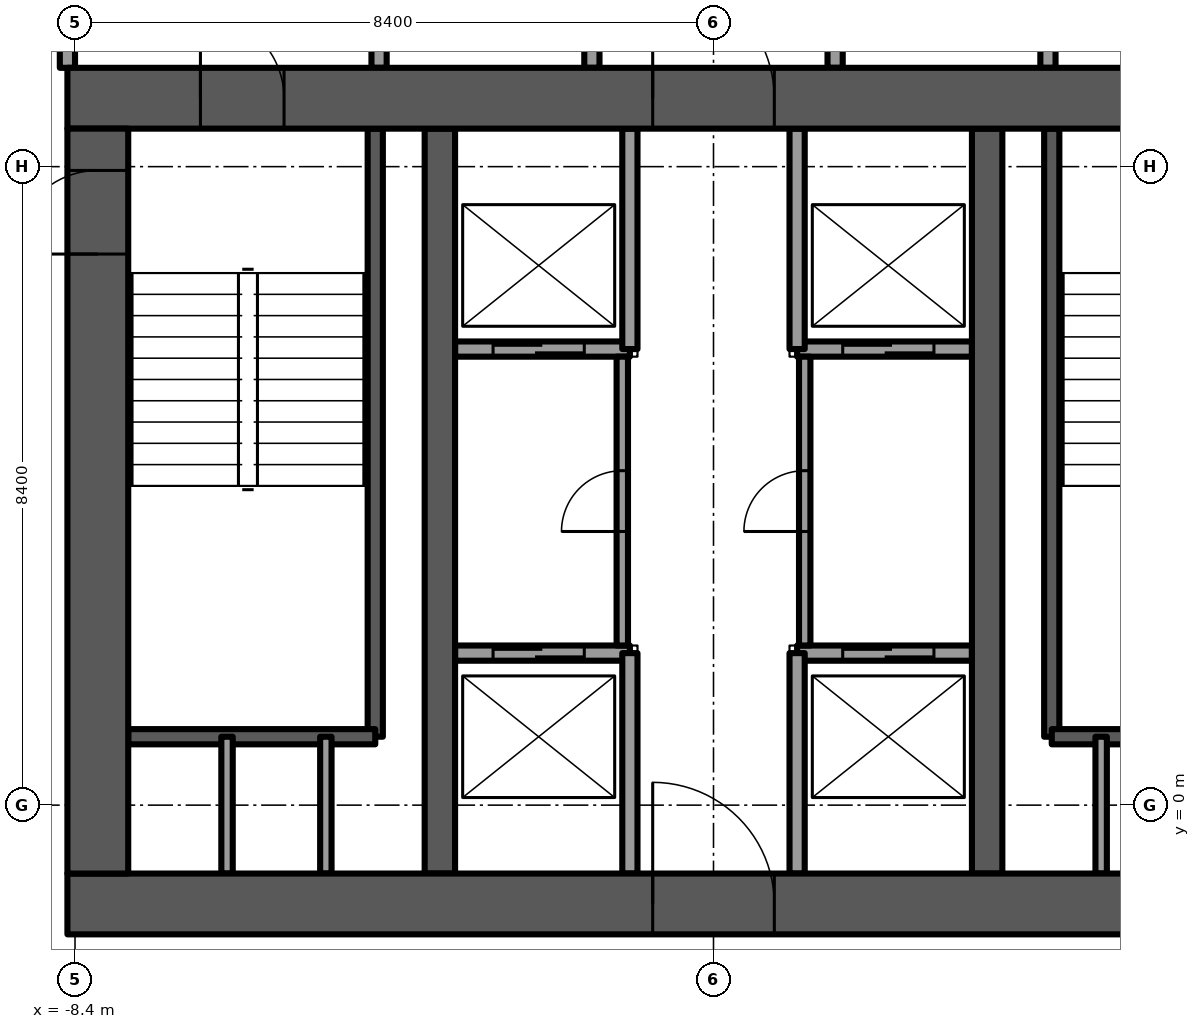
"""IFC4 building model, lengths in metres.
Left out: names, types, materials, properties, quantities, classifications, styles, units other than length and angle.
Written with IfcOpenShell. Run it as: python <this file> out.ifc"""

import sys

from ifc_helpers import new_model, si_unit, direction, frame, frame_2d, origin, place, context, subcontext, project, spatial, rectangle, extrude, element, fill, save


model = new_model("IFC4")
c1 = context("Model", 3, precision=1e-05, world=origin(), true_north=direction((0.0, 1.0)))
c2 = subcontext(c1, "Body", "Model", "MODEL_VIEW")
j1 = project(units=[si_unit("LENGTHUNIT", "METRE"), si_unit("PLANEANGLEUNIT", "RADIAN")], contexts=[c1])
p1 = place(None, origin())
s1 = spatial("IfcSite", under=j1, at=p1, CompositionType="ELEMENT")
p2 = place(p1, origin())
s2 = spatial("IfcBuilding", under=s1, at=p2, CompositionType="ELEMENT")
p3 = place(p2, frame((0.0, 0.0, 190.75)))
s3 = spatial("IfcBuildingStorey", under=s2, at=p3, CompositionType="ELEMENT", Elevation=190.75)
p4 = place(p3, frame((-8.5, -1.3, -0.3), z_axis=(0.0, 0.0, 1.0), x_axis=(1.0, 0.0, 0.0)))
e1 = element("IfcWall", 1, at=p4, inside=s3, PredefinedType="SHEAR", context=c2, shape_type="SweptSolid", body=[
    extrude(rectangle(XDim=17.0, YDim=0.8, at=frame_2d((8.5, 0.0))), origin(), (0.0, 0.0, 1.0), 3.75),
])
p5 = place(p4, frame((7.7, 0.0, 0.0)))
e2 = element("IfcOpeningElement", 2, at=p5, cuts=e1, PredefinedType="OPENING", context=c2, shape_type="SweptSolid", body=[
    extrude(rectangle(XDim=1.6, YDim=2.1, at=frame_2d((0.8, 1.05))), frame((0.0, 0.4, 0.0), z_axis=(0.0, -1.0, 0.0), x_axis=(1.0, 0.0, 0.0)), (0.0, 0.0, 1.0), 0.8),
])
p6 = place(p3, frame((-8.5, 9.3, -0.3), z_axis=(0.0, 0.0, 1.0), x_axis=(1.0, 0.0, 0.0)))
e3 = element("IfcWall", 3, at=p6, inside=s3, PredefinedType="SHEAR", context=c2, shape_type="SweptSolid", body=[
    extrude(rectangle(XDim=17.0, YDim=0.8, at=frame_2d((8.5, 0.0))), origin(), (0.0, 0.0, 1.0), 3.75),
])
p7 = place(p6, frame((7.7, 0.0, 0.0)))
e4 = element("IfcOpeningElement", 4, at=p7, cuts=e3, PredefinedType="OPENING", context=c2, shape_type="SweptSolid", body=[
    extrude(rectangle(XDim=1.6, YDim=2.1, at=frame_2d((0.8, 1.05))), frame((0.0, 0.4, 0.0), z_axis=(0.0, -1.0, 0.0), x_axis=(1.0, 0.0, 0.0)), (0.0, 0.0, 1.0), 0.8),
])
p8 = place(p6, frame((1.75, 0.0, 0.0)))
e5 = element("IfcOpeningElement", 5, at=p8, cuts=e3, PredefinedType="OPENING", context=c2, shape_type="SweptSolid", body=[
    extrude(rectangle(XDim=1.1, YDim=2.1, at=frame_2d((0.55, 1.05))), frame((0.0, 0.4, 0.0), z_axis=(0.0, -1.0, 0.0), x_axis=(1.0, 0.0, 0.0)), (0.0, 0.0, 1.0), 0.8),
])
p9 = place(p6, frame((14.15, 0.0, 0.0)))
e6 = element("IfcOpeningElement", 6, at=p9, cuts=e3, PredefinedType="OPENING", context=c2, shape_type="SweptSolid", body=[
    extrude(rectangle(XDim=1.1, YDim=2.1, at=frame_2d((0.55, 1.05))), frame((0.0, 0.4, 0.0), z_axis=(0.0, -1.0, 0.0), x_axis=(1.0, 0.0, 0.0)), (0.0, 0.0, 1.0), 0.8),
])
p10 = place(p3, frame((-8.1, -0.9, -0.3), z_axis=(0.0, 0.0, 1.0), x_axis=(0.0, 1.0, 0.0)))
e7 = element("IfcWall", 7, at=p10, inside=s3, PredefinedType="SHEAR", context=c2, shape_type="SweptSolid", body=[
    extrude(rectangle(XDim=9.8, YDim=0.8, at=frame_2d((4.9, 0.0))), origin(), (0.0, 0.0, 1.0), 3.75),
])
p11 = place(p10, frame((8.15, 0.0, 0.0)))
e8 = element("IfcOpeningElement", 8, at=p11, cuts=e7, PredefinedType="OPENING", context=c2, shape_type="SweptSolid", body=[
    extrude(rectangle(XDim=1.1, YDim=2.1, at=frame_2d((0.55, 1.05))), frame((0.0, 0.4, 0.0), z_axis=(0.0, -1.0, 0.0), x_axis=(1.0, 0.0, 0.0)), (0.0, 0.0, 1.0), 0.8),
])
for number, where, z_axis, x_axis in (
    (9, (-3.6, -0.9, -0.3), (0.0, 0.0, 1.0), (0.0, 1.0, 0.0)),
    (10, (3.6, -0.9, -0.3), (0.0, 0.0, 1.0), (0.0, 1.0, 0.0)),
):
    element("IfcWall", number, at=place(p3, frame(where, z_axis=z_axis, x_axis=x_axis)), inside=s3, PredefinedType="SHEAR", context=c2, shape_type="SweptSolid", body=[
        extrude(rectangle(XDim=9.8, YDim=0.4, at=frame_2d((4.9, 0.0))), origin(), (0.0, 0.0, 1.0), 3.75),
    ])
p12 = place(p3, frame((-6.826, 17.292, 0.0), z_axis=(0.0, 0.0, 1.0), x_axis=(-0.50000659594, -0.866021595583, 0.0)))
e11 = element("IfcWall", 11, at=p12, inside=s3, PredefinedType="SOLIDWALL", context=c2, shape_type="SweptSolid", body=[
    extrude(rectangle(XDim=20.354, YDim=0.15, at=frame_2d((10.177, 0.0))), origin(), (0.0, 0.0, 1.0), 3.45),
])
p13 = place(p12, frame((5.12, 0.0, 0.15)))
e12 = element("IfcOpeningElement", 12, at=p13, cuts=e11, PredefinedType="OPENING", context=c2, shape_type="SweptSolid", body=[
    extrude(rectangle(XDim=1.4, YDim=2.85, at=frame_2d((0.7, 1.425))), frame((0.0, 0.075, 0.0), z_axis=(0.0, -1.0, 0.0), x_axis=(1.0, 0.0, 0.0)), (0.0, 0.0, 1.0), 0.15),
])
p14 = place(p12, frame((7.663, 0.0, 0.15)))
e13 = element("IfcOpeningElement", 13, at=p14, cuts=e11, PredefinedType="OPENING", context=c2, shape_type="SweptSolid", body=[
    extrude(rectangle(XDim=1.6, YDim=2.85, at=frame_2d((0.8, 1.425))), frame((0.0, 0.075, 0.0), z_axis=(0.0, -1.0, 0.0), x_axis=(1.0, 0.0, 0.0)), (0.0, 0.0, 1.0), 0.15),
])
p15 = place(p12, frame((9.863, 0.0, 0.15)))
e14 = element("IfcOpeningElement", 14, at=p15, cuts=e11, PredefinedType="OPENING", context=c2, shape_type="SweptSolid", body=[
    extrude(rectangle(XDim=1.4, YDim=2.85, at=frame_2d((0.7, 1.425))), frame((0.0, 0.075, 0.0), z_axis=(0.0, -1.0, 0.0), x_axis=(1.0, 0.0, 0.0)), (0.0, 0.0, 1.0), 0.15),
])
p16 = place(p12, frame((12.492, 0.0, 0.15)))
e15 = element("IfcOpeningElement", 15, at=p16, cuts=e11, PredefinedType="OPENING", context=c2, shape_type="SweptSolid", body=[
    extrude(rectangle(XDim=0.9, YDim=2.85, at=frame_2d((0.45, 1.425))), frame((0.0, 0.075, 0.0), z_axis=(0.0, -1.0, 0.0), x_axis=(1.0, 0.0, 0.0)), (0.0, 0.0, 1.0), 0.15),
])
p17 = place(p12, frame((14.063, 0.0, 0.0)))
e16 = element("IfcOpeningElement", 16, at=p17, cuts=e11, PredefinedType="OPENING", context=c2, shape_type="SweptSolid", body=[
    extrude(rectangle(XDim=1.4, YDim=2.4, at=frame_2d((0.7, 1.2))), frame((0.0, 0.075, 0.0), z_axis=(0.0, -1.0, 0.0), x_axis=(1.0, 0.0, 0.0)), (0.0, 0.0, 1.0), 0.15),
])
p18 = place(p12, frame((16.063, 0.0, 0.15)))
e17 = element("IfcOpeningElement", 17, at=p18, cuts=e11, PredefinedType="OPENING", context=c2, shape_type="SweptSolid", body=[
    extrude(rectangle(XDim=0.9, YDim=2.85, at=frame_2d((0.45, 1.425))), frame((0.0, 0.075, 0.0), z_axis=(0.0, -1.0, 0.0), x_axis=(1.0, 0.0, 0.0)), (0.0, 0.0, 1.0), 0.15),
])
p19 = place(p12, frame((17.116, 0.0, 0.0)))
e18 = element("IfcOpeningElement", 18, at=p19, cuts=e11, PredefinedType="OPENING", context=c2, shape_type="SweptSolid", body=[
    extrude(rectangle(XDim=1.4, YDim=2.4, at=frame_2d((0.7, 1.2))), frame((0.0, 0.075, 0.0), z_axis=(0.0, -1.0, 0.0), x_axis=(1.0, 0.0, 0.0)), (0.0, 0.0, 1.0), 0.15),
])
p20 = place(p12, frame((0.735, 0.0, 0.15)))
e19 = element("IfcOpeningElement", 19, at=p20, cuts=e11, PredefinedType="OPENING", context=c2, shape_type="SweptSolid", body=[
    extrude(rectangle(XDim=1.6, YDim=2.73, at=frame_2d((0.8, 1.365))), frame((0.0, 0.075, 0.0), z_axis=(0.0, -1.0, 0.0), x_axis=(1.0, 0.0, 0.0)), (0.0, 0.0, 1.0), 0.15),
])
p21 = place(p3, frame((-3.4, 2.0, 0.0), z_axis=(0.0, 0.0, 1.0), x_axis=(1.0, 0.0, 0.0)))
e20 = element("IfcWall", 20, at=p21, inside=s3, PredefinedType="PARTITIONING", context=c2, shape_type="SweptSolid", body=[
    extrude(rectangle(XDim=2.3, YDim=0.2, at=frame_2d((1.15, 0.0))), origin(), (0.0, 0.0, 1.0), 3.45),
])
p22 = place(p21, frame((0.5, 0.0, 0.0)))
e21 = element("IfcOpeningElement", 21, at=p22, cuts=e20, PredefinedType="OPENING", context=c2, shape_type="SweptSolid", body=[
    extrude(rectangle(XDim=1.2, YDim=2.1, at=frame_2d((0.6, 1.05))), frame((0.0, 0.1, 0.0), z_axis=(0.0, -1.0, 0.0), x_axis=(1.0, 0.0, 0.0)), (0.0, 0.0, 1.0), 0.2),
])
p23 = place(p3, frame((-3.4, 6.0, 0.0), z_axis=(0.0, 0.0, 1.0), x_axis=(1.0, 0.0, 0.0)))
e22 = element("IfcWall", 22, at=p23, inside=s3, PredefinedType="PARTITIONING", context=c2, shape_type="SweptSolid", body=[
    extrude(rectangle(XDim=2.3, YDim=0.2, at=frame_2d((1.15, 0.0))), origin(), (0.0, 0.0, 1.0), 3.45),
])
p24 = place(p23, frame((0.5, 0.0, 0.0)))
e23 = element("IfcOpeningElement", 23, at=p24, cuts=e22, PredefinedType="OPENING", context=c2, shape_type="SweptSolid", body=[
    extrude(rectangle(XDim=1.2, YDim=2.1, at=frame_2d((0.6, 1.05))), frame((0.0, 0.1, 0.0), z_axis=(0.0, -1.0, 0.0), x_axis=(1.0, 0.0, 0.0)), (0.0, 0.0, 1.0), 0.2),
])
p25 = place(p3, frame((1.1, 2.0, 0.0), z_axis=(0.0, 0.0, 1.0), x_axis=(1.0, 0.0, 0.0)))
e24 = element("IfcWall", 24, at=p25, inside=s3, PredefinedType="PARTITIONING", context=c2, shape_type="SweptSolid", body=[
    extrude(rectangle(XDim=2.3, YDim=0.2, at=frame_2d((1.15, 0.0))), origin(), (0.0, 0.0, 1.0), 3.45),
])
p26 = place(p25, frame((0.6, 0.0, 0.0)))
e25 = element("IfcOpeningElement", 25, at=p26, cuts=e24, PredefinedType="OPENING", context=c2, shape_type="SweptSolid", body=[
    extrude(rectangle(XDim=1.2, YDim=2.1, at=frame_2d((0.6, 1.05))), frame((0.0, 0.1, 0.0), z_axis=(0.0, -1.0, 0.0), x_axis=(1.0, 0.0, 0.0)), (0.0, 0.0, 1.0), 0.2),
])
p27 = place(p3, frame((1.1, 6.0, 0.0), z_axis=(0.0, 0.0, 1.0), x_axis=(1.0, 0.0, 0.0)))
e26 = element("IfcWall", 26, at=p27, inside=s3, PredefinedType="PARTITIONING", context=c2, shape_type="SweptSolid", body=[
    extrude(rectangle(XDim=2.3, YDim=0.2, at=frame_2d((1.15, 0.0))), origin(), (0.0, 0.0, 1.0), 3.45),
])
p28 = place(p27, frame((0.6, 0.0, 0.0)))
e27 = element("IfcOpeningElement", 27, at=p28, cuts=e26, PredefinedType="OPENING", context=c2, shape_type="SweptSolid", body=[
    extrude(rectangle(XDim=1.2, YDim=2.1, at=frame_2d((0.6, 1.05))), frame((0.0, 0.1, 0.0), z_axis=(0.0, -1.0, 0.0), x_axis=(1.0, 0.0, 0.0)), (0.0, 0.0, 1.0), 0.2),
])
for number, where, z_axis, x_axis in (
    (28, (-1.1, -0.9, 0.0), (0.0, 0.0, 1.0), (0.0, 1.0, 0.0)),
    (29, (1.1, -0.9, 0.0), (0.0, 0.0, 1.0), (0.0, 1.0, 0.0)),
    (30, (-1.1, 6.0, 0.0), (0.0, 0.0, 1.0), (0.0, 1.0, 0.0)),
    (31, (1.1, 6.0, 0.0), (0.0, 0.0, 1.0), (0.0, 1.0, 0.0)),
):
    element("IfcWall", number, at=place(p3, frame(where, z_axis=z_axis, x_axis=x_axis)), inside=s3, PredefinedType="PARTITIONING", context=c2, shape_type="SweptSolid", body=[
        extrude(rectangle(XDim=2.9, YDim=0.2, at=frame_2d((1.45, 0.0))), origin(), (0.0, 0.0, 1.0), 3.45),
    ])
p29 = place(p3, frame((-4.45, 0.9, -0.3), z_axis=(0.0, 0.0, 1.0), x_axis=(0.0, 1.0, 0.0)))
e32 = element("IfcWall", 32, at=p29, inside=s3, PredefinedType="SOLIDWALL", context=c2, shape_type="SweptSolid", body=[
    extrude(rectangle(XDim=8.0, YDim=0.2, at=frame_2d((4.0, 0.0))), origin(), (0.0, 0.0, 1.0), 3.75),
])
p30 = place(p3, frame((-7.7, 0.9, -0.3), z_axis=(0.0, 0.0, 1.0), x_axis=(1.0, 0.0, 0.0)))
e33 = element("IfcWall", 33, at=p30, inside=s3, PredefinedType="SOLIDWALL", context=c2, shape_type="SweptSolid", body=[
    extrude(rectangle(XDim=3.25, YDim=0.2, at=frame_2d((1.625, 0.0))), origin(), (0.0, 0.0, 1.0), 3.75),
])
for number, where, z_axis, x_axis in (
    (34, (-6.4, -0.9, 0.0), (0.0, 0.0, 1.0), (0.0, 1.0, 0.0)),
    (35, (-5.1, -0.9, 0.0), (0.0, 0.0, 1.0), (0.0, 1.0, 0.0)),
):
    element("IfcWall", number, at=place(p3, frame(where, z_axis=z_axis, x_axis=x_axis)), inside=s3, PredefinedType="PARTITIONING", context=c2, shape_type="SweptSolid", body=[
        extrude(rectangle(XDim=1.8, YDim=0.15, at=frame_2d((0.9, 0.0))), origin(), (0.0, 0.0, 1.0), 3.45),
    ])
p31 = place(p3, frame((4.45, 0.9, -0.3), z_axis=(0.0, 0.0, 1.0), x_axis=(0.0, 1.0, 0.0)))
e36 = element("IfcWall", 36, at=p31, inside=s3, PredefinedType="SOLIDWALL", context=c2, shape_type="SweptSolid", body=[
    extrude(rectangle(XDim=8.0, YDim=0.2, at=frame_2d((4.0, 0.0))), origin(), (0.0, 0.0, 1.0), 3.75),
])
p32 = place(p3, frame((4.45, 0.9, -0.3), z_axis=(0.0, 0.0, 1.0), x_axis=(1.0, 0.0, 0.0)))
e37 = element("IfcWall", 37, at=p32, inside=s3, PredefinedType="SOLIDWALL", context=c2, shape_type="SweptSolid", body=[
    extrude(rectangle(XDim=3.25, YDim=0.2, at=frame_2d((1.625, 0.0))), origin(), (0.0, 0.0, 1.0), 3.75),
])
p33 = place(p3, frame((5.1, -0.9, 0.0), z_axis=(0.0, 0.0, 1.0), x_axis=(0.0, 1.0, 0.0)))
e38 = element("IfcWall", 38, at=p33, inside=s3, PredefinedType="PARTITIONING", context=c2, shape_type="SweptSolid", body=[
    extrude(rectangle(XDim=1.8, YDim=0.15, at=frame_2d((0.9, 0.0))), origin(), (0.0, 0.0, 1.0), 3.45),
])
p34 = place(p3, frame((-8.5, 9.7, 0.0), z_axis=(0.0, 0.0, 1.0), x_axis=(0.0, 1.0, 0.0)))
e39 = element("IfcWall", 39, at=p34, inside=s3, PredefinedType="PARTITIONING", context=c2, shape_type="SweptSolid", body=[
    extrude(rectangle(XDim=3.9, YDim=0.2, at=frame_2d((1.95, 0.0))), origin(), (0.0, 0.0, 1.0), 3.45),
])
p35 = place(p34, frame((1.35, 0.0, 0.0)))
e40 = element("IfcOpeningElement", 40, at=p35, cuts=e39, PredefinedType="OPENING", context=c2, shape_type="SweptSolid", body=[
    extrude(rectangle(XDim=1.2, YDim=2.1, at=frame_2d((0.6, 1.05))), frame((0.0, 0.1, 0.0), z_axis=(0.0, -1.0, 0.0), x_axis=(1.0, 0.0, 0.0)), (0.0, 0.0, 1.0), 0.2),
])
p36 = place(p3, frame((-4.4, 9.7, 0.0), z_axis=(0.0, 0.0, 1.0), x_axis=(0.0, 1.0, 0.0)))
e41 = element("IfcWall", 41, at=p36, inside=s3, PredefinedType="PARTITIONING", context=c2, shape_type="SweptSolid", body=[
    extrude(rectangle(XDim=3.9, YDim=0.2, at=frame_2d((1.95, 0.0))), origin(), (0.0, 0.0, 1.0), 3.45),
])
p37 = place(p36, frame((1.35, 0.0, 0.0)))
e42 = element("IfcOpeningElement", 42, at=p37, cuts=e41, PredefinedType="OPENING", context=c2, shape_type="SweptSolid", body=[
    extrude(rectangle(XDim=1.2, YDim=2.1, at=frame_2d((0.6, 1.05))), frame((0.0, 0.1, 0.0), z_axis=(0.0, -1.0, 0.0), x_axis=(1.0, 0.0, 0.0)), (0.0, 0.0, 1.0), 0.2),
])
p38 = place(p3, frame((4.4, 9.7, 0.0), z_axis=(0.0, 0.0, 1.0), x_axis=(0.0, 1.0, 0.0)))
e43 = element("IfcWall", 43, at=p38, inside=s3, PredefinedType="PARTITIONING", context=c2, shape_type="SweptSolid", body=[
    extrude(rectangle(XDim=3.9, YDim=0.2, at=frame_2d((1.95, 0.0))), origin(), (0.0, 0.0, 1.0), 3.45),
])
p39 = place(p38, frame((1.35, 0.0, 0.0)))
e44 = element("IfcOpeningElement", 44, at=p39, cuts=e43, PredefinedType="OPENING", context=c2, shape_type="SweptSolid", body=[
    extrude(rectangle(XDim=1.2, YDim=2.1, at=frame_2d((0.6, 1.05))), frame((0.0, 0.1, 0.0), z_axis=(0.0, -1.0, 0.0), x_axis=(1.0, 0.0, 0.0)), (0.0, 0.0, 1.0), 0.2),
])
for number, where, z_axis, x_axis in (
    (45, (-1.6, 9.7, 0.0), (0.0, 0.0, 1.0), (0.0, 1.0, 0.0)),
    (46, (1.6, 9.7, 0.0), (0.0, 0.0, 1.0), (0.0, 1.0, 0.0)),
):
    element("IfcWall", number, at=place(p3, frame(where, z_axis=z_axis, x_axis=x_axis)), inside=s3, PredefinedType="PARTITIONING", context=c2, shape_type="SweptSolid", body=[
        extrude(rectangle(XDim=3.9, YDim=0.2, at=frame_2d((1.95, 0.0))), origin(), (0.0, 0.0, 1.0), 3.45),
    ])
p40 = place(p3, frame((-1.2, 2.1, 0.0), z_axis=(0.0, 0.0, 1.0), x_axis=(0.0, 1.0, 0.0)))
e47 = element("IfcWall", 47, at=p40, inside=s3, PredefinedType="PARTITIONING", context=c2, shape_type="SweptSolid", body=[
    extrude(rectangle(XDim=3.8, YDim=0.15, at=frame_2d((1.9, 0.0))), origin(), (0.0, 0.0, 1.0), 3.45),
])
p41 = place(p40, frame((1.5, 0.0, 0.0)))
e48 = element("IfcOpeningElement", 48, at=p41, cuts=e47, PredefinedType="OPENING", context=c2, shape_type="SweptSolid", body=[
    extrude(rectangle(XDim=0.8, YDim=2.1, at=frame_2d((0.4, 1.05))), frame((0.0, 0.075, 0.0), z_axis=(0.0, -1.0, 0.0), x_axis=(1.0, 0.0, 0.0)), (0.0, 0.0, 1.0), 0.15),
])
p42 = place(p3, frame((1.2, 2.1, 0.0), z_axis=(0.0, 0.0, 1.0), x_axis=(0.0, 1.0, 0.0)))
e49 = element("IfcWall", 49, at=p42, inside=s3, PredefinedType="PARTITIONING", context=c2, shape_type="SweptSolid", body=[
    extrude(rectangle(XDim=3.8, YDim=0.15, at=frame_2d((1.9, 0.0))), origin(), (0.0, 0.0, 1.0), 3.45),
])
p43 = place(p42, frame((1.5, 0.0, 0.0)))
e50 = element("IfcOpeningElement", 50, at=p43, cuts=e49, PredefinedType="OPENING", context=c2, shape_type="SweptSolid", body=[
    extrude(rectangle(XDim=0.8, YDim=2.1, at=frame_2d((0.4, 1.05))), frame((0.0, 0.075, 0.0), z_axis=(0.0, -1.0, 0.0), x_axis=(1.0, 0.0, 0.0)), (0.0, 0.0, 1.0), 0.15),
])
p44 = place(p22, origin())
e51 = element("IfcDoor", 51, at=p44, inside=s3, OperationType="SLIDING_TO_LEFT", PredefinedType="DOOR", context=c2, shape_type="SweptSolid", body=[
    extrude(rectangle(XDim=1.2, YDim=2.1, at=frame_2d((0.6, 1.05))), frame((0.0, 0.025, 0.0), z_axis=(0.0, -1.0, 0.0), x_axis=(1.0, 0.0, 0.0)), (0.0, 0.0, 1.0), 0.05),
])
fill(e21, e51)
p45 = place(p26, origin())
e52 = element("IfcDoor", 52, at=p45, inside=s3, OperationType="SLIDING_TO_LEFT", PredefinedType="DOOR", context=c2, shape_type="SweptSolid", body=[
    extrude(rectangle(XDim=1.2, YDim=2.1, at=frame_2d((0.6, 1.05))), frame((0.0, 0.025, 0.0), z_axis=(0.0, -1.0, 0.0), x_axis=(1.0, 0.0, 0.0)), (0.0, 0.0, 1.0), 0.05),
])
fill(e25, e52)
p46 = place(p24, origin())
e53 = element("IfcDoor", 53, at=p46, inside=s3, OperationType="SLIDING_TO_LEFT", PredefinedType="DOOR", context=c2, shape_type="SweptSolid", body=[
    extrude(rectangle(XDim=1.2, YDim=2.1, at=frame_2d((0.6, 1.05))), frame((0.0, 0.025, 0.0), z_axis=(0.0, -1.0, 0.0), x_axis=(1.0, 0.0, 0.0)), (0.0, 0.0, 1.0), 0.05),
])
fill(e23, e53)
p47 = place(p28, origin())
e54 = element("IfcDoor", 54, at=p47, inside=s3, OperationType="SLIDING_TO_LEFT", PredefinedType="DOOR", context=c2, shape_type="SweptSolid", body=[
    extrude(rectangle(XDim=1.2, YDim=2.1, at=frame_2d((0.6, 1.05))), frame((0.0, 0.025, 0.0), z_axis=(0.0, -1.0, 0.0), x_axis=(1.0, 0.0, 0.0)), (0.0, 0.0, 1.0), 0.05),
])
fill(e27, e54)
p48 = place(p5, origin())
e55 = element("IfcDoor", 55, at=p48, inside=s3, OperationType="DOUBLE_DOOR_SINGLE_SWING", PredefinedType="DOOR", context=c2, shape_type="SweptSolid", body=[
    extrude(rectangle(XDim=1.6, YDim=2.1, at=frame_2d((0.8, 1.05))), frame((0.0, 0.025, 0.0), z_axis=(0.0, -1.0, 0.0), x_axis=(1.0, 0.0, 0.0)), (0.0, 0.0, 1.0), 0.05),
])
fill(e2, e55)
p49 = place(p7, origin())
e56 = element("IfcDoor", 56, at=p49, inside=s3, OperationType="DOUBLE_DOOR_SINGLE_SWING", PredefinedType="DOOR", context=c2, shape_type="SweptSolid", body=[
    extrude(rectangle(XDim=1.6, YDim=2.1, at=frame_2d((0.8, 1.05))), frame((0.0, 0.025, 0.0), z_axis=(0.0, -1.0, 0.0), x_axis=(1.0, 0.0, 0.0)), (0.0, 0.0, 1.0), 0.05),
])
fill(e4, e56)
p50 = place(p8, origin())
e57 = element("IfcDoor", 57, at=p50, inside=s3, OperationType="SINGLE_SWING_LEFT", PredefinedType="DOOR", context=c2, shape_type="SweptSolid", body=[
    extrude(rectangle(XDim=1.1, YDim=2.1, at=frame_2d((0.55, 1.05))), frame((0.0, 0.025, 0.0), z_axis=(0.0, -1.0, 0.0), x_axis=(1.0, 0.0, 0.0)), (0.0, 0.0, 1.0), 0.05),
])
fill(e5, e57)
p51 = place(p11, origin())
e58 = element("IfcDoor", 58, at=p51, inside=s3, OperationType="SINGLE_SWING_RIGHT", PredefinedType="DOOR", context=c2, shape_type="SweptSolid", body=[
    extrude(rectangle(XDim=1.1, YDim=2.1, at=frame_2d((0.55, 1.05))), frame((0.0, 0.025, 0.0), z_axis=(0.0, -1.0, 0.0), x_axis=(1.0, 0.0, 0.0)), (0.0, 0.0, 1.0), 0.05),
])
fill(e8, e58)
p52 = place(p41, origin())
e59 = element("IfcDoor", 59, at=p52, inside=s3, OperationType="SINGLE_SWING_LEFT", PredefinedType="DOOR", context=c2, shape_type="SweptSolid", body=[
    extrude(rectangle(XDim=0.8, YDim=2.1, at=frame_2d((0.4, 1.05))), frame((0.0, 0.025, 0.0), z_axis=(0.0, -1.0, 0.0), x_axis=(1.0, 0.0, 0.0)), (0.0, 0.0, 1.0), 0.05),
])
fill(e48, e59)
p53 = place(p43, origin())
e60 = element("IfcDoor", 60, at=p53, inside=s3, OperationType="SINGLE_SWING_RIGHT", PredefinedType="DOOR", context=c2, shape_type="SweptSolid", body=[
    extrude(rectangle(XDim=0.8, YDim=2.1, at=frame_2d((0.4, 1.05))), frame((0.0, 0.025, 0.0), z_axis=(0.0, -1.0, 0.0), x_axis=(1.0, 0.0, 0.0)), (0.0, 0.0, 1.0), 0.05),
])
fill(e50, e60)
save(model, sys.argv[1])
